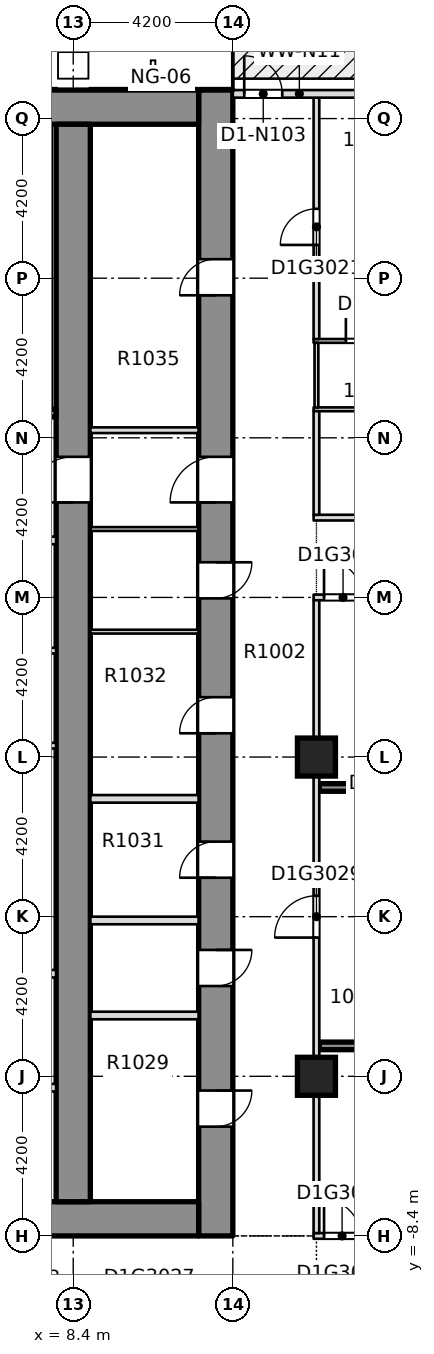
"""IFC4 building model, lengths in metres.
Left out: names, types, materials, properties, quantities, classifications, styles, units other than length and angle.
Written with IfcOpenShell. Run it as: python <this file> out.ifc"""

import sys

from ifc_helpers import new_model, si_unit, direction, frame, frame_2d, origin, origin_2d, place, context, subcontext, project, spatial, rectangle, extrude, element, fill, save


model = new_model("IFC4")
c1 = context("Model", 3, precision=1e-05, world=origin(), true_north=direction((0.0, 1.0)))
c2 = subcontext(c1, "Body", "Model", "MODEL_VIEW")
j1 = project(units=[si_unit("LENGTHUNIT", "METRE"), si_unit("PLANEANGLEUNIT", "RADIAN")], contexts=[c1])
p1 = place(None, origin())
s1 = spatial("IfcSite", under=j1, at=p1, CompositionType="ELEMENT")
p2 = place(p1, origin())
s2 = spatial("IfcBuilding", under=s1, at=p2, CompositionType="ELEMENT")
p3 = place(p2, frame((0.0, 0.0, 48.3)))
s3 = spatial("IfcBuildingStorey", under=s2, at=p3, CompositionType="ELEMENT", Elevation=48.3)
p4 = place(p3, frame((12.15, -8.4, -0.32), z_axis=(0.0, 0.0, 1.0), x_axis=(0.0, 1.0, 0.0)))
e1 = element("IfcWall", 1, at=p4, inside=s3, PredefinedType="SHEAR", context=c2, shape_type="SweptSolid", body=[
    extrude(rectangle(XDim=30.15, YDim=0.9, at=frame_2d((15.075, 0.0))), origin(), (0.0, 0.0, 1.0), 3.45),
])
p5 = place(p4, frame((2.875, 0.0, 0.32)))
e2 = element("IfcOpeningElement", 2, at=p5, cuts=e1, PredefinedType="OPENING", context=c2, shape_type="SweptSolid", body=[
    extrude(rectangle(XDim=0.95, YDim=2.1, at=frame_2d((0.475, 1.05))), frame((0.0, 0.46, 0.0), z_axis=(0.0, -1.0, 0.0), x_axis=(1.0, 0.0, 0.0)), (0.0, 0.0, 1.0), 0.92),
])
p6 = place(p4, frame((6.575, 0.0, 0.32)))
e3 = element("IfcOpeningElement", 3, at=p6, cuts=e1, PredefinedType="OPENING", context=c2, shape_type="SweptSolid", body=[
    extrude(rectangle(XDim=0.95, YDim=2.1, at=frame_2d((0.475, 1.05))), frame((0.0, 0.46, 0.0), z_axis=(0.0, -1.0, 0.0), x_axis=(1.0, 0.0, 0.0)), (0.0, 0.0, 1.0), 0.92),
])
p7 = place(p4, frame((9.425, 0.0, 0.32)))
e4 = element("IfcOpeningElement", 4, at=p7, cuts=e1, PredefinedType="OPENING", context=c2, shape_type="SweptSolid", body=[
    extrude(rectangle(XDim=0.95, YDim=2.1, at=frame_2d((0.475, 1.05))), frame((0.0, 0.46, 0.0), z_axis=(0.0, -1.0, 0.0), x_axis=(1.0, 0.0, 0.0)), (0.0, 0.0, 1.0), 0.92),
])
p8 = place(p4, frame((13.225, 0.0, 0.32)))
e5 = element("IfcOpeningElement", 5, at=p8, cuts=e1, PredefinedType="OPENING", context=c2, shape_type="SweptSolid", body=[
    extrude(rectangle(XDim=0.95, YDim=2.1, at=frame_2d((0.475, 1.05))), frame((0.0, 0.46, 0.0), z_axis=(0.0, -1.0, 0.0), x_axis=(1.0, 0.0, 0.0)), (0.0, 0.0, 1.0), 0.92),
])
p9 = place(p4, frame((16.775, 0.0, 0.32)))
e6 = element("IfcOpeningElement", 6, at=p9, cuts=e1, PredefinedType="OPENING", context=c2, shape_type="SweptSolid", body=[
    extrude(rectangle(XDim=0.95, YDim=2.1, at=frame_2d((0.475, 1.05))), frame((0.0, 0.46, 0.0), z_axis=(0.0, -1.0, 0.0), x_axis=(1.0, 0.0, 0.0)), (0.0, 0.0, 1.0), 0.92),
])
p10 = place(p4, frame((24.75, 0.0, 0.32)))
e7 = element("IfcOpeningElement", 7, at=p10, cuts=e1, PredefinedType="OPENING", context=c2, shape_type="SweptSolid", body=[
    extrude(rectangle(XDim=0.95, YDim=2.1, at=frame_2d((0.475, 1.05))), frame((0.0, 0.46, 0.0), z_axis=(0.0, -1.0, 0.0), x_axis=(1.0, 0.0, 0.0)), (0.0, 0.0, 1.0), 0.92),
])
p11 = place(p4, frame((19.3, 0.0, 0.32)))
e8 = element("IfcOpeningElement", 8, at=p11, cuts=e1, PredefinedType="OPENING", context=c2, shape_type="SweptSolid", body=[
    extrude(rectangle(XDim=1.2, YDim=2.1, at=frame_2d((0.6, 1.05))), frame((0.0, 0.46, 0.0), z_axis=(0.0, -1.0, 0.0), x_axis=(1.0, 0.0, 0.0)), (0.0, 0.0, 1.0), 0.92),
])
p12 = place(p3, frame((-11.7, -7.95, -0.32), z_axis=(0.0, 0.0, 1.0), x_axis=(1.0, 0.0, 0.0)))
e9 = element("IfcWall", 9, at=p12, inside=s3, PredefinedType="SHEAR", context=c2, shape_type="SweptSolid", body=[
    extrude(rectangle(XDim=23.4, YDim=0.9, at=frame_2d((11.7, 0.0))), origin(), (0.0, 0.0, 1.0), 3.45),
])
p13 = place(p12, frame((6.95, 0.0, 0.32)))
e10 = element("IfcOpeningElement", 10, at=p13, cuts=e9, PredefinedType="OPENING", context=c2, shape_type="SweptSolid", body=[
    extrude(rectangle(XDim=1.8, YDim=2.1, at=frame_2d((0.9, 1.05))), frame((0.0, 0.46, 0.0), z_axis=(0.0, -1.0, 0.0), x_axis=(1.0, 0.0, 0.0)), (0.0, 0.0, 1.0), 0.92),
])
p14 = place(p12, frame((14.65, 0.0, 0.32)))
e11 = element("IfcOpeningElement", 11, at=p14, cuts=e9, PredefinedType="OPENING", context=c2, shape_type="SweptSolid", body=[
    extrude(rectangle(XDim=1.8, YDim=2.1, at=frame_2d((0.9, 1.05))), frame((0.0, 0.46, 0.0), z_axis=(0.0, -1.0, 0.0), x_axis=(1.0, 0.0, 0.0)), (0.0, 0.0, 1.0), 0.92),
])
p15 = place(p3, frame((-11.7, 21.3, -0.32), z_axis=(0.0, 0.0, 1.0), x_axis=(1.0, 0.0, 0.0)))
e12 = element("IfcWall", 12, at=p15, inside=s3, PredefinedType="SOLIDWALL", context=c2, shape_type="SweptSolid", body=[
    extrude(rectangle(XDim=23.4, YDim=0.9, at=frame_2d((11.7, 0.0))), origin(), (0.0, 0.0, 1.0), 3.45),
])
p16 = place(p3, frame((8.4, -7.5, -0.32), z_axis=(0.0, 0.0, 1.0), x_axis=(0.0, 1.0, 0.0)))
e13 = element("IfcWall", 13, at=p16, inside=s3, PredefinedType="SHEAR", context=c2, shape_type="SweptSolid", body=[
    extrude(rectangle(XDim=28.35, YDim=0.9, at=frame_2d((14.175, 0.0))), origin(), (0.0, 0.0, 1.0), 3.45),
])
p17 = place(p16, frame((18.4, 0.0, 0.32)))
e14 = element("IfcOpeningElement", 14, at=p17, cuts=e13, PredefinedType="OPENING", context=c2, shape_type="SweptSolid", body=[
    extrude(rectangle(XDim=1.2, YDim=2.1, at=frame_2d((0.6, 1.05))), frame((0.0, 0.46, 0.0), z_axis=(0.0, -1.0, 0.0), x_axis=(1.0, 0.0, 0.0)), (0.0, 0.0, 1.0), 0.92),
])
for number, where, z_axis, x_axis in (
    (15, (14.8, -4.2, -0.32), (0.0, 0.0, 1.0), (1.0, 0.0, 0.0)),
    (16, (14.8, 4.2, -0.32), (0.0, 0.0, 1.0), (1.0, 0.0, 0.0)),
):
    element("IfcColumn", number, at=place(p3, frame(where, z_axis=z_axis, x_axis=x_axis)), inside=s3, PredefinedType="COLUMN", context=c2, shape_type="SweptSolid", body=[
        extrude(rectangle(XDim=1.0, YDim=1.0, at=origin_2d()), origin(), (0.0, 0.0, 1.0), 3.45),
    ])
p18 = place(p3, frame((14.725, -8.4, 0.0), z_axis=(0.0, 0.0, 1.0), x_axis=(1.0, 0.0, 0.0)))
e17 = element("IfcWall", 17, at=p18, inside=s3, PredefinedType="PARTITIONING", context=c2, shape_type="SweptSolid", body=[
    extrude(rectangle(XDim=11.025, YDim=0.15, at=frame_2d((5.512, 0.0))), origin(), (0.0, 0.0, 1.0), 3.13),
])
p19 = place(p18, frame((0.275, 0.0, 0.0)))
e18 = element("IfcOpeningElement", 18, at=p19, cuts=e17, PredefinedType="OPENING", context=c2, shape_type="SweptSolid", body=[
    extrude(rectangle(XDim=0.95, YDim=2.1, at=frame_2d((0.475, 1.05))), frame((0.0, 0.085, 0.0), z_axis=(0.0, -1.0, 0.0), x_axis=(1.0, 0.0, 0.0)), (0.0, 0.0, 1.0), 0.17),
])
p20 = place(p3, frame((14.875, -3.4, 0.0), z_axis=(0.0, 0.0, 1.0), x_axis=(1.0, 0.0, 0.0)))
e19 = element("IfcWall", 19, at=p20, inside=s3, PredefinedType="SOLIDWALL", context=c2, shape_type="SweptSolid", body=[
    extrude(rectangle(XDim=8.725, YDim=0.2, at=frame_2d((4.363, 0.0))), origin(), (0.0, 0.0, 1.0), 3.13),
])
p21 = place(p3, frame((14.875, 3.4, 0.0), z_axis=(0.0, 0.0, 1.0), x_axis=(1.0, 0.0, 0.0)))
e20 = element("IfcWall", 20, at=p21, inside=s3, PredefinedType="SOLIDWALL", context=c2, shape_type="SweptSolid", body=[
    extrude(rectangle(XDim=5.575, YDim=0.2, at=frame_2d((2.788, 0.0))), origin(), (0.0, 0.0, 1.0), 3.13),
])
p22 = place(p3, frame((14.725, 8.4, 0.0), z_axis=(0.0, 0.0, 1.0), x_axis=(1.0, 0.0, 0.0)))
e21 = element("IfcWall", 21, at=p22, inside=s3, PredefinedType="PARTITIONING", context=c2, shape_type="SweptSolid", body=[
    extrude(rectangle(XDim=11.025, YDim=0.15, at=frame_2d((5.512, 0.0))), origin(), (0.0, 0.0, 1.0), 3.13),
])
p23 = place(p22, frame((0.275, 0.0, 0.0)))
e22 = element("IfcOpeningElement", 22, at=p23, cuts=e21, PredefinedType="OPENING", context=c2, shape_type="SweptSolid", body=[
    extrude(rectangle(XDim=1.0, YDim=2.1, at=frame_2d((0.5, 1.05))), frame((0.0, 0.085, 0.0), z_axis=(0.0, -1.0, 0.0), x_axis=(1.0, 0.0, 0.0)), (0.0, 0.0, 1.0), 0.17),
])
p24 = place(p3, frame((14.725, 10.5, 0.0), z_axis=(0.0, 0.0, 1.0), x_axis=(1.0, 0.0, 0.0)))
e23 = element("IfcWall", 23, at=p24, inside=s3, PredefinedType="PARTITIONING", context=c2, shape_type="SweptSolid", body=[
    extrude(rectangle(XDim=11.025, YDim=0.15, at=frame_2d((5.512, 0.0))), origin(), (0.0, 0.0, 1.0), 3.13),
])
p25 = place(p24, frame((5.15, 0.0, 0.0)))
e24 = element("IfcOpeningElement", 24, at=p25, cuts=e23, PredefinedType="OPENING", context=c2, shape_type="SweptSolid", body=[
    extrude(rectangle(XDim=1.0, YDim=2.1, at=frame_2d((0.5, 1.05))), frame((0.0, 0.085, 0.0), z_axis=(0.0, -1.0, 0.0), x_axis=(1.0, 0.0, 0.0)), (0.0, 0.0, 1.0), 0.17),
])
p26 = place(p3, frame((14.725, 13.35, 0.0), z_axis=(0.0, 0.0, 1.0), x_axis=(1.0, 0.0, 0.0)))
e25 = element("IfcWall", 25, at=p26, inside=s3, PredefinedType="PARTITIONING", context=c2, shape_type="SweptSolid", body=[
    extrude(rectangle(XDim=2.525, YDim=0.1, at=frame_2d((1.262, 0.0))), origin(), (0.0, 0.0, 1.0), 3.13),
])
p27 = place(p3, frame((14.725, 15.15, 0.0), z_axis=(0.0, 0.0, 1.0), x_axis=(1.0, 0.0, 0.0)))
e26 = element("IfcWall", 26, at=p27, inside=s3, PredefinedType="PARTITIONING", context=c2, shape_type="SweptSolid", body=[
    extrude(rectangle(XDim=2.525, YDim=0.1, at=frame_2d((1.262, 0.0))), origin(), (0.0, 0.0, 1.0), 3.13),
])
p28 = place(p27, frame((0.85, 0.0, 0.0)))
e27 = element("IfcOpeningElement", 27, at=p28, cuts=e26, PredefinedType="OPENING", context=c2, shape_type="SweptSolid", body=[
    extrude(rectangle(XDim=0.85, YDim=2.1, at=frame_2d((0.425, 1.05))), frame((0.0, 0.06, 0.0), z_axis=(0.0, -1.0, 0.0), x_axis=(1.0, 0.0, 0.0)), (0.0, 0.0, 1.0), 0.12),
])
p29 = place(p3, frame((14.8, -8.325, 0.0), z_axis=(0.0, 0.0, 1.0), x_axis=(0.0, 1.0, 0.0)))
e28 = element("IfcWall", 28, at=p29, inside=s3, PredefinedType="PARTITIONING", context=c2, shape_type="SweptSolid", body=[
    extrude(rectangle(XDim=16.65, YDim=0.15, at=frame_2d((8.325, 0.0))), origin(), (0.0, 0.0, 1.0), 3.13),
])
p30 = place(p29, frame((7.775, 0.0, 0.0)))
e29 = element("IfcOpeningElement", 29, at=p30, cuts=e28, PredefinedType="OPENING", context=c2, shape_type="SweptSolid", body=[
    extrude(rectangle(XDim=1.1, YDim=2.1, at=frame_2d((0.55, 1.05))), frame((0.0, 0.085, 0.0), z_axis=(0.0, -1.0, 0.0), x_axis=(1.0, 0.0, 0.0)), (0.0, 0.0, 1.0), 0.17),
])
p31 = place(p3, frame((14.8, 10.575, 0.0), z_axis=(0.0, 0.0, 1.0), x_axis=(0.0, 1.0, 0.0)))
e30 = element("IfcWall", 30, at=p31, inside=s3, PredefinedType="PARTITIONING", context=c2, shape_type="SweptSolid", body=[
    extrude(rectangle(XDim=2.725, YDim=0.15, at=frame_2d((1.363, 0.0))), origin(), (0.0, 0.0, 1.0), 3.13),
])
p32 = place(p3, frame((14.8, 13.4, 0.0), z_axis=(0.0, 0.0, 1.0), x_axis=(0.0, 1.0, 0.0)))
e31 = element("IfcWall", 31, at=p32, inside=s3, PredefinedType="PARTITIONING", context=c2, shape_type="SweptSolid", body=[
    extrude(rectangle(XDim=1.7, YDim=0.1, at=frame_2d((0.85, 0.0))), origin(), (0.0, 0.0, 1.0), 3.13),
])
p33 = place(p3, frame((14.8, 15.2, 0.0), z_axis=(0.0, 0.0, 1.0), x_axis=(0.0, 1.0, 0.0)))
e32 = element("IfcWall", 32, at=p33, inside=s3, PredefinedType="PARTITIONING", context=c2, shape_type="SweptSolid", body=[
    extrude(rectangle(XDim=6.35, YDim=0.15, at=frame_2d((3.175, 0.0))), origin(), (0.0, 0.0, 1.0), 3.13),
])
p34 = place(p33, frame((2.475, 0.0, 0.0)))
e33 = element("IfcOpeningElement", 33, at=p34, cuts=e32, PredefinedType="OPENING", context=c2, shape_type="SweptSolid", body=[
    extrude(rectangle(XDim=0.95, YDim=2.1, at=frame_2d((0.475, 1.05))), frame((0.0, 0.085, 0.0), z_axis=(0.0, -1.0, 0.0), x_axis=(1.0, 0.0, 0.0)), (0.0, 0.0, 1.0), 0.17),
])
p35 = place(p3, frame((16.1, 21.65, 0.0), z_axis=(0.0, 0.0, 1.0), x_axis=(-1.0, 0.0, 0.0)))
e34 = element("IfcWall", 34, at=p35, inside=s3, PredefinedType="STANDARD", context=c2, shape_type="SweptSolid", body=[
    extrude(rectangle(XDim=3.5, YDim=0.2, at=frame_2d((1.75, 0.0))), origin(), (0.0, 0.0, 1.0), 3.13),
])
p36 = place(p35, frame((2.2, 0.0, 0.0)))
e35 = element("IfcOpeningElement", 35, at=p36, cuts=e34, PredefinedType="OPENING", context=c2, shape_type="SweptSolid", body=[
    extrude(rectangle(XDim=1.0, YDim=2.4, at=frame_2d((0.5, 1.2))), frame((0.0, 0.11, 0.0), z_axis=(0.0, -1.0, 0.0), x_axis=(1.0, 0.0, 0.0)), (0.0, 0.0, 1.0), 0.22),
])
for number, where, z_axis, x_axis in (
    (36, (5.575, -4.5, 0.0), (0.0, 0.0, 1.0), (1.0, 0.0, 0.0)),
    (37, (5.575, -1.5, 0.0), (0.0, 0.0, 1.0), (1.0, 0.0, 0.0)),
):
    element("IfcWall", number, at=place(p3, frame(where, z_axis=z_axis, x_axis=x_axis)), inside=s3, PredefinedType="PARTITIONING", context=c2, shape_type="SweptSolid", body=[
        extrude(rectangle(XDim=2.374, YDim=0.2, at=frame_2d((1.187, 0.0))), origin(), (0.0, 0.0, 1.0), 3.13),
    ])
p37 = place(p3, frame((5.425, 4.5, 0.0), z_axis=(0.0, 0.0, 1.0), x_axis=(1.0, 0.0, 0.0)))
e38 = element("IfcWall", 38, at=p37, inside=s3, PredefinedType="PARTITIONING", context=c2, shape_type="SweptSolid", body=[
    extrude(rectangle(XDim=2.524, YDim=0.15, at=frame_2d((1.262, 0.0))), origin(), (0.0, 0.0, 1.0), 3.13),
])
p38 = place(p3, frame((-7.949, 7.0, 0.0), z_axis=(0.0, 0.0, 1.0), x_axis=(1.0, 0.0, 0.0)))
e39 = element("IfcWall", 39, at=p38, inside=s3, PredefinedType="PARTITIONING", context=c2, shape_type="SweptSolid", body=[
    extrude(rectangle(XDim=15.898, YDim=0.15, at=frame_2d((7.949, 0.0))), origin(), (0.0, 0.0, 1.0), 3.13),
])
p39 = place(p38, frame((7.249, 0.0, 0.0)))
e40 = element("IfcOpeningElement", 40, at=p39, cuts=e39, PredefinedType="OPENING", context=c2, shape_type="SweptSolid", body=[
    extrude(rectangle(XDim=1.4, YDim=2.1, at=frame_2d((0.7, 1.05))), frame((0.0, 0.085, 0.0), z_axis=(0.0, -1.0, 0.0), x_axis=(1.0, 0.0, 0.0)), (0.0, 0.0, 1.0), 0.17),
])
p40 = place(p3, frame((3.6, 9.9, 0.0), z_axis=(0.0, 0.0, 1.0), x_axis=(1.0, 0.0, 0.0)))
e41 = element("IfcWall", 41, at=p40, inside=s3, PredefinedType="PARTITIONING", context=c2, shape_type="SweptSolid", body=[
    extrude(rectangle(XDim=4.349, YDim=0.2, at=frame_2d((2.174, 0.0))), origin(), (0.0, 0.0, 1.0), 3.13),
])
p41 = place(p40, frame((2.25, 0.0, 0.0)))
e42 = element("IfcOpeningElement", 42, at=p41, cuts=e41, PredefinedType="OPENING", context=c2, shape_type="SweptSolid", body=[
    extrude(rectangle(XDim=1.1, YDim=2.1, at=frame_2d((0.55, 1.05))), frame((0.0, 0.11, 0.0), z_axis=(0.0, -1.0, 0.0), x_axis=(1.0, 0.0, 0.0)), (0.0, 0.0, 1.0), 0.22),
])
p42 = place(p3, frame((3.425, 13.25, 0.0), z_axis=(0.0, 0.0, 1.0), x_axis=(1.0, 0.0, 0.0)))
e43 = element("IfcWall", 43, at=p42, inside=s3, PredefinedType="SOLIDWALL", context=c2, shape_type="SweptSolid", body=[
    extrude(rectangle(XDim=4.524, YDim=0.2, at=frame_2d((2.262, 0.0))), origin(), (0.0, 0.0, 1.0), 3.13),
])
p43 = place(p42, frame((1.825, 0.0, 0.0)))
e44 = element("IfcOpeningElement", 44, at=p43, cuts=e43, PredefinedType="OPENING", context=c2, shape_type="SweptSolid", body=[
    extrude(rectangle(XDim=1.2, YDim=2.1, at=frame_2d((0.6, 1.05))), frame((0.0, 0.11, 0.0), z_axis=(0.0, -1.0, 0.0), x_axis=(1.0, 0.0, 0.0)), (0.0, 0.0, 1.0), 0.22),
])
for number, where, z_axis, x_axis in (
    (45, (8.851, -2.6, 0.0), (0.0, 0.0, 1.0), (1.0, 0.0, 0.0)),
    (46, (8.851, -0.1, 0.0), (0.0, 0.0, 1.0), (1.0, 0.0, 0.0)),
    (47, (8.851, 3.1, 0.0), (0.0, 0.0, 1.0), (1.0, 0.0, 0.0)),
):
    element("IfcWall", number, at=place(p3, frame(where, z_axis=z_axis, x_axis=x_axis)), inside=s3, PredefinedType="PARTITIONING", context=c2, shape_type="SweptSolid", body=[
        extrude(rectangle(XDim=2.848, YDim=0.2, at=frame_2d((1.424, 0.0))), origin(), (0.0, 0.0, 1.0), 3.13),
    ])
for number, where, z_axis, x_axis in (
    (48, (8.851, 7.5, 0.0), (0.0, 0.0, 1.0), (1.0, 0.0, 0.0)),
    (49, (8.851, 10.2, 0.0), (0.0, 0.0, 1.0), (1.0, 0.0, 0.0)),
):
    element("IfcWall", number, at=place(p3, frame(where, z_axis=z_axis, x_axis=x_axis)), inside=s3, PredefinedType="PARTITIONING", context=c2, shape_type="SweptSolid", body=[
        extrude(rectangle(XDim=2.848, YDim=0.1, at=frame_2d((1.424, 0.0))), origin(), (0.0, 0.0, 1.0), 3.13),
    ])
p44 = place(p3, frame((8.851, 12.8, 0.0), z_axis=(0.0, 0.0, 1.0), x_axis=(1.0, 0.0, 0.0)))
e50 = element("IfcWall", 50, at=p44, inside=s3, PredefinedType="PARTITIONING", context=c2, shape_type="SweptSolid", body=[
    extrude(rectangle(XDim=2.848, YDim=0.15, at=frame_2d((1.424, 0.0))), origin(), (0.0, 0.0, 1.0), 3.13),
])
p45 = place(p19, origin())
e51 = element("IfcDoor", 51, at=p45, inside=s3, OperationType="SINGLE_SWING_LEFT", PredefinedType="DOOR", context=c2, shape_type="SweptSolid", body=[
    extrude(rectangle(XDim=0.95, YDim=2.1, at=frame_2d((0.475, 1.05))), frame((0.0, 0.025, 0.0), z_axis=(0.0, -1.0, 0.0), x_axis=(1.0, 0.0, 0.0)), (0.0, 0.0, 1.0), 0.05),
])
fill(e18, e51)
p46 = place(p23, origin())
e52 = element("IfcDoor", 52, at=p46, inside=s3, OperationType="SINGLE_SWING_RIGHT", PredefinedType="DOOR", context=c2, shape_type="SweptSolid", body=[
    extrude(rectangle(XDim=1.0, YDim=2.1, at=frame_2d((0.5, 1.05))), frame((0.0, 0.025, 0.0), z_axis=(0.0, -1.0, 0.0), x_axis=(1.0, 0.0, 0.0)), (0.0, 0.0, 1.0), 0.05),
])
fill(e22, e52)
p47 = place(p34, origin())
e53 = element("IfcDoor", 53, at=p47, inside=s3, OperationType="SINGLE_SWING_LEFT", PredefinedType="DOOR", context=c2, shape_type="SweptSolid", body=[
    extrude(rectangle(XDim=0.95, YDim=2.1, at=frame_2d((0.475, 1.05))), frame((0.0, 0.025, 0.0), z_axis=(0.0, -1.0, 0.0), x_axis=(1.0, 0.0, 0.0)), (0.0, 0.0, 1.0), 0.05),
])
fill(e33, e53)
p48 = place(p28, origin())
e54 = element("IfcDoor", 54, at=p48, inside=s3, OperationType="SINGLE_SWING_RIGHT", PredefinedType="DOOR", context=c2, shape_type="SweptSolid", body=[
    extrude(rectangle(XDim=0.85, YDim=2.1, at=frame_2d((0.425, 1.05))), frame((0.0, 0.025, 0.0), z_axis=(0.0, -1.0, 0.0), x_axis=(1.0, 0.0, 0.0)), (0.0, 0.0, 1.0), 0.05),
])
fill(e27, e54)
p49 = place(p30, origin())
e55 = element("IfcDoor", 55, at=p49, inside=s3, OperationType="SINGLE_SWING_RIGHT", PredefinedType="DOOR", context=c2, shape_type="SweptSolid", body=[
    extrude(rectangle(XDim=1.1, YDim=2.1, at=frame_2d((0.55, 1.05))), frame((0.0, 0.025, 0.0), z_axis=(0.0, -1.0, 0.0), x_axis=(1.0, 0.0, 0.0)), (0.0, 0.0, 1.0), 0.05),
])
fill(e29, e55)
p50 = place(p36, origin())
e56 = element("IfcDoor", 56, at=p50, inside=s3, OperationType="SINGLE_SWING_LEFT", PredefinedType="DOOR", context=c2, shape_type="SweptSolid", body=[
    extrude(rectangle(XDim=1.0, YDim=2.4, at=frame_2d((0.5, 1.2))), frame((0.0, 0.025, 0.0), z_axis=(0.0, -1.0, 0.0), x_axis=(1.0, 0.0, 0.0)), (0.0, 0.0, 1.0), 0.05),
])
fill(e35, e56)
p51 = place(p5, origin())
e57 = element("IfcDoor", 57, at=p51, inside=s3, OperationType="SINGLE_SWING_LEFT", PredefinedType="DOOR", context=c2, shape_type="SweptSolid", body=[
    extrude(rectangle(XDim=0.95, YDim=2.1, at=frame_2d((0.475, 1.05))), frame((0.0, 0.025, 0.0), z_axis=(0.0, -1.0, 0.0), x_axis=(1.0, 0.0, 0.0)), (0.0, 0.0, 1.0), 0.05),
])
fill(e2, e57)
p52 = place(p6, origin())
e58 = element("IfcDoor", 58, at=p52, inside=s3, OperationType="SINGLE_SWING_LEFT", PredefinedType="DOOR", context=c2, shape_type="SweptSolid", body=[
    extrude(rectangle(XDim=0.95, YDim=2.1, at=frame_2d((0.475, 1.05))), frame((0.0, 0.025, 0.0), z_axis=(0.0, -1.0, 0.0), x_axis=(1.0, 0.0, 0.0)), (0.0, 0.0, 1.0), 0.05),
])
fill(e3, e58)
p53 = place(p7, origin())
e59 = element("IfcDoor", 59, at=p53, inside=s3, OperationType="SINGLE_SWING_LEFT", PredefinedType="DOOR", context=c2, shape_type="SweptSolid", body=[
    extrude(rectangle(XDim=0.95, YDim=2.1, at=frame_2d((0.475, 1.05))), frame((0.0, 0.025, 0.0), z_axis=(0.0, -1.0, 0.0), x_axis=(1.0, 0.0, 0.0)), (0.0, 0.0, 1.0), 0.05),
])
fill(e4, e59)
p54 = place(p8, origin())
e60 = element("IfcDoor", 60, at=p54, inside=s3, OperationType="SINGLE_SWING_LEFT", PredefinedType="DOOR", context=c2, shape_type="SweptSolid", body=[
    extrude(rectangle(XDim=0.95, YDim=2.1, at=frame_2d((0.475, 1.05))), frame((0.0, 0.025, 0.0), z_axis=(0.0, -1.0, 0.0), x_axis=(1.0, 0.0, 0.0)), (0.0, 0.0, 1.0), 0.05),
])
fill(e5, e60)
p55 = place(p9, origin())
e61 = element("IfcDoor", 61, at=p55, inside=s3, OperationType="SINGLE_SWING_LEFT", PredefinedType="DOOR", context=c2, shape_type="SweptSolid", body=[
    extrude(rectangle(XDim=0.95, YDim=2.1, at=frame_2d((0.475, 1.05))), frame((0.0, 0.025, 0.0), z_axis=(0.0, -1.0, 0.0), x_axis=(1.0, 0.0, 0.0)), (0.0, 0.0, 1.0), 0.05),
])
fill(e6, e61)
p56 = place(p10, origin())
e62 = element("IfcDoor", 62, at=p56, inside=s3, OperationType="SINGLE_SWING_LEFT", PredefinedType="DOOR", context=c2, shape_type="SweptSolid", body=[
    extrude(rectangle(XDim=0.95, YDim=2.1, at=frame_2d((0.475, 1.05))), frame((0.0, 0.025, 0.0), z_axis=(0.0, -1.0, 0.0), x_axis=(1.0, 0.0, 0.0)), (0.0, 0.0, 1.0), 0.05),
])
fill(e7, e62)
p57 = place(p11, origin())
e63 = element("IfcDoor", 63, at=p57, inside=s3, OperationType="SINGLE_SWING_LEFT", PredefinedType="DOOR", context=c2, shape_type="SweptSolid", body=[
    extrude(rectangle(XDim=1.2, YDim=2.1, at=frame_2d((0.6, 1.05))), frame((0.0, 0.025, 0.0), z_axis=(0.0, -1.0, 0.0), x_axis=(1.0, 0.0, 0.0)), (0.0, 0.0, 1.0), 0.05),
])
fill(e8, e63)
p58 = place(p17, origin())
e64 = element("IfcDoor", 64, at=p58, inside=s3, OperationType="SINGLE_SWING_LEFT", PredefinedType="DOOR", context=c2, shape_type="SweptSolid", body=[
    extrude(rectangle(XDim=1.2, YDim=2.1, at=frame_2d((0.6, 1.05))), frame((0.0, 0.025, 0.0), z_axis=(0.0, -1.0, 0.0), x_axis=(1.0, 0.0, 0.0)), (0.0, 0.0, 1.0), 0.05),
])
fill(e14, e64)
save(model, sys.argv[1])
